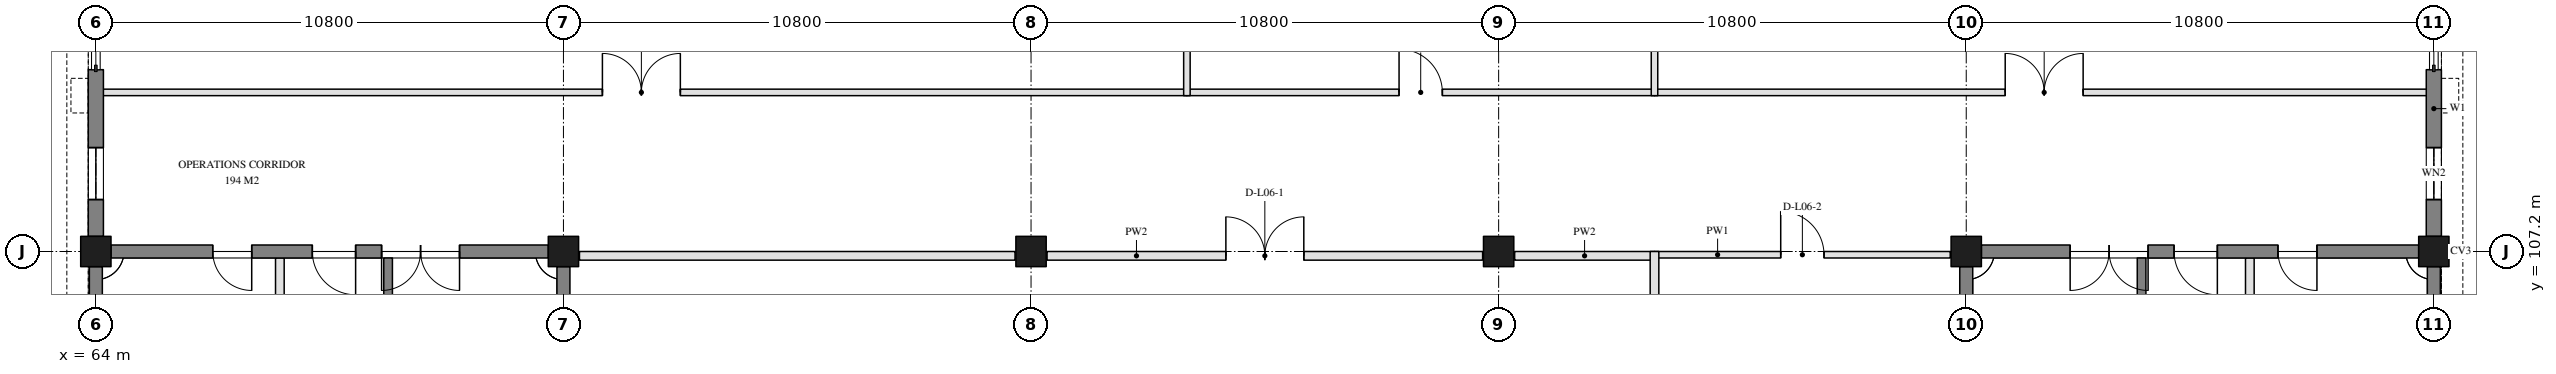
"""IFC4 building model, lengths in metres.
Left out: names, types, materials, properties, quantities, classifications, styles, units other than length and angle.
Written with IfcOpenShell. Run it as: python <this file> out.ifc"""

import sys

from ifc_helpers import new_model, si_unit, direction, frame, frame_2d, origin, origin_2d, place, context, subcontext, project, spatial, rectangle, extrude, element, fill, save


model = new_model("IFC4")
c1 = context("Model", 3, precision=1e-05, world=origin(), true_north=direction((0.0, 1.0)))
c2 = subcontext(c1, "Body", "Model", "MODEL_VIEW")
j1 = project(units=[si_unit("LENGTHUNIT", "METRE"), si_unit("PLANEANGLEUNIT", "RADIAN")], contexts=[c1])
p1 = place(None, origin())
s1 = spatial("IfcSite", under=j1, at=p1, CompositionType="ELEMENT")
p2 = place(p1, origin())
s2 = spatial("IfcBuilding", under=s1, at=p2, CompositionType="ELEMENT")
p3 = place(p2, frame((0.0, 0.0, 24.3)))
s3 = spatial("IfcBuildingStorey", under=s2, at=p3, CompositionType="ELEMENT", Elevation=24.3)
for number, where, z_axis, x_axis in (
    (1, (64.0, 107.2, 0.0), (0.0, 0.0, 1.0), (1.0, 0.0, 0.0)),
    (2, (74.8, 107.2, 0.0), (0.0, 0.0, 1.0), (1.0, 0.0, 0.0)),
    (3, (85.6, 107.2, 0.0), (0.0, 0.0, 1.0), (1.0, 0.0, 0.0)),
    (4, (96.4, 107.2, 0.0), (0.0, 0.0, 1.0), (1.0, 0.0, 0.0)),
    (5, (107.2, 107.2, 0.0), (0.0, 0.0, 1.0), (1.0, 0.0, 0.0)),
    (6, (118.0, 107.2, 0.0), (0.0, 0.0, 1.0), (1.0, 0.0, 0.0)),
):
    element("IfcColumn", number, at=place(p3, frame(where, z_axis=z_axis, x_axis=x_axis)), inside=s3, PredefinedType="COLUMN", context=c2, shape_type="SweptSolid", body=[
        extrude(rectangle(XDim=0.7, YDim=0.7, at=origin_2d()), origin(), (0.0, 0.0, 1.0), 3.9),
    ])
p4 = place(p3, frame((74.8, 96.75, 0.0), z_axis=(0.0, 0.0, 1.0), x_axis=(0.0, 1.0, 0.0)))
e7 = element("IfcWall", 7, at=p4, inside=s3, PredefinedType="SOLIDWALL", context=c2, shape_type="SweptSolid", body=[
    extrude(rectangle(XDim=10.1, YDim=0.3, at=frame_2d((5.05, 0.0))), origin(), (0.0, 0.0, 1.0), 3.9),
])
p5 = place(p3, frame((74.45, 107.2, 0.0), z_axis=(0.0, 0.0, 1.0), x_axis=(-1.0, 0.0, 0.0)))
e8 = element("IfcWall", 8, at=p5, inside=s3, PredefinedType="SOLIDWALL", context=c2, shape_type="SweptSolid", body=[
    extrude(rectangle(XDim=10.1, YDim=0.3, at=frame_2d((5.05, 0.0))), origin(), (0.0, 0.0, 1.0), 3.9),
])
p6 = place(p5, frame((2.05, 0.0, 0.0)))
e9 = element("IfcOpeningElement", 9, at=p6, cuts=e8, PredefinedType="OPENING", context=c2, shape_type="SweptSolid", body=[
    extrude(rectangle(XDim=1.8, YDim=2.1, at=frame_2d((0.9, 1.05))), frame((0.0, 0.16, 0.0), z_axis=(0.0, -1.0, 0.0), x_axis=(1.0, 0.0, 0.0)), (0.0, 0.0, 1.0), 0.32),
])
p7 = place(p5, frame((4.45, 0.0, 0.0)))
e10 = element("IfcOpeningElement", 10, at=p7, cuts=e8, PredefinedType="OPENING", context=c2, shape_type="SweptSolid", body=[
    extrude(rectangle(XDim=1.0, YDim=2.1, at=frame_2d((0.5, 1.05))), frame((0.0, 0.16, 0.0), z_axis=(0.0, -1.0, 0.0), x_axis=(1.0, 0.0, 0.0)), (0.0, 0.0, 1.0), 0.32),
])
p8 = place(p5, frame((6.85, 0.0, 0.0)))
e11 = element("IfcOpeningElement", 11, at=p8, cuts=e8, PredefinedType="OPENING", context=c2, shape_type="SweptSolid", body=[
    extrude(rectangle(XDim=0.9, YDim=2.1, at=frame_2d((0.45, 1.05))), frame((0.0, 0.16, 0.0), z_axis=(0.0, -1.0, 0.0), x_axis=(1.0, 0.0, 0.0)), (0.0, 0.0, 1.0), 0.32),
])
for number, where, z_axis, x_axis in (
    (12, (64.0, 106.85, 0.0), (0.0, 0.0, 1.0), (0.0, -1.0, 0.0)),
    (13, (118.0, 96.75, 0.0), (0.0, 0.0, 1.0), (0.0, 1.0, 0.0)),
):
    element("IfcWall", number, at=place(p3, frame(where, z_axis=z_axis, x_axis=x_axis)), inside=s3, PredefinedType="SOLIDWALL", context=c2, shape_type="SweptSolid", body=[
        extrude(rectangle(XDim=10.1, YDim=0.3, at=frame_2d((5.05, 0.0))), origin(), (0.0, 0.0, 1.0), 3.9),
    ])
p9 = place(p3, frame((117.65, 107.2, 0.0), z_axis=(0.0, 0.0, 1.0), x_axis=(-1.0, 0.0, 0.0)))
e14 = element("IfcWall", 14, at=p9, inside=s3, PredefinedType="SOLIDWALL", context=c2, shape_type="SweptSolid", body=[
    extrude(rectangle(XDim=10.1, YDim=0.3, at=frame_2d((5.05, 0.0))), origin(), (0.0, 0.0, 1.0), 3.9),
])
p10 = place(p9, frame((6.25, 0.0, 0.0)))
e15 = element("IfcOpeningElement", 15, at=p10, cuts=e14, PredefinedType="OPENING", context=c2, shape_type="SweptSolid", body=[
    extrude(rectangle(XDim=1.8, YDim=2.1, at=frame_2d((0.9, 1.05))), frame((0.0, 0.16, 0.0), z_axis=(0.0, -1.0, 0.0), x_axis=(1.0, 0.0, 0.0)), (0.0, 0.0, 1.0), 0.32),
])
p11 = place(p9, frame((4.65, 0.0, 0.0)))
e16 = element("IfcOpeningElement", 16, at=p11, cuts=e14, PredefinedType="OPENING", context=c2, shape_type="SweptSolid", body=[
    extrude(rectangle(XDim=1.0, YDim=2.1, at=frame_2d((0.5, 1.05))), frame((0.0, 0.16, 0.0), z_axis=(0.0, -1.0, 0.0), x_axis=(1.0, 0.0, 0.0)), (0.0, 0.0, 1.0), 0.32),
])
p12 = place(p9, frame((2.35, 0.0, 0.0)))
e17 = element("IfcOpeningElement", 17, at=p12, cuts=e14, PredefinedType="OPENING", context=c2, shape_type="SweptSolid", body=[
    extrude(rectangle(XDim=0.9, YDim=2.1, at=frame_2d((0.45, 1.05))), frame((0.0, 0.16, 0.0), z_axis=(0.0, -1.0, 0.0), x_axis=(1.0, 0.0, 0.0)), (0.0, 0.0, 1.0), 0.32),
])
p13 = place(p3, frame((107.2, 106.85, 0.0), z_axis=(0.0, 0.0, 1.0), x_axis=(0.0, -1.0, 0.0)))
e18 = element("IfcWall", 18, at=p13, inside=s3, PredefinedType="SOLIDWALL", context=c2, shape_type="SweptSolid", body=[
    extrude(rectangle(XDim=10.1, YDim=0.3, at=frame_2d((5.05, 0.0))), origin(), (0.0, 0.0, 1.0), 3.9),
])
p14 = place(p3, frame((64.0, 107.55, 0.0), z_axis=(0.0, 0.0, 1.0), x_axis=(0.0, 1.0, 0.0)))
e19 = element("IfcWall", 19, at=p14, inside=s3, PredefinedType="SOLIDWALL", context=c2, shape_type="SweptSolid", body=[
    extrude(rectangle(XDim=3.85, YDim=0.35, at=frame_2d((1.925, 0.0))), origin(), (0.0, 0.0, 1.0), 2.95),
])
p15 = place(p14, frame((0.85, 0.0, 0.9)))
e20 = element("IfcOpeningElement", 20, at=p15, cuts=e19, PredefinedType="OPENING", context=c2, shape_type="SweptSolid", body=[
    extrude(rectangle(XDim=1.2, YDim=1.2, at=frame_2d((0.6, 0.6))), frame((0.0, 0.185, 0.0), z_axis=(0.0, -1.0, 0.0), x_axis=(1.0, 0.0, 0.0)), (0.0, 0.0, 1.0), 0.37),
])
p16 = place(p3, frame((118.0, 107.55, 0.0), z_axis=(0.0, 0.0, 1.0), x_axis=(0.0, 1.0, 0.0)))
e21 = element("IfcWall", 21, at=p16, inside=s3, PredefinedType="SOLIDWALL", context=c2, shape_type="SweptSolid", body=[
    extrude(rectangle(XDim=3.85, YDim=0.35, at=frame_2d((1.925, 0.0))), origin(), (0.0, 0.0, 1.0), 2.95),
])
p17 = place(p16, frame((0.85, 0.0, 0.9)))
e22 = element("IfcOpeningElement", 22, at=p17, cuts=e21, PredefinedType="OPENING", context=c2, shape_type="SweptSolid", body=[
    extrude(rectangle(XDim=1.2, YDim=1.2, at=frame_2d((0.6, 0.6))), frame((0.0, 0.185, 0.0), z_axis=(0.0, -1.0, 0.0), x_axis=(1.0, 0.0, 0.0)), (0.0, 0.0, 1.0), 0.37),
])
p18 = place(p3, frame((70.75, 104.8, 0.0), z_axis=(0.0, 0.0, 1.0), x_axis=(0.0, 1.0, 0.0)))
e23 = element("IfcWall", 23, at=p18, inside=s3, PredefinedType="SOLIDWALL", context=c2, shape_type="SweptSolid", body=[
    extrude(rectangle(XDim=2.25, YDim=0.2, at=frame_2d((1.125, 0.0))), origin(), (0.0, 0.0, 1.0), 3.9),
])
p19 = place(p3, frame((68.25, 104.8, 0.0), z_axis=(0.0, 0.0, 1.0), x_axis=(0.0, 1.0, 0.0)))
e24 = element("IfcWall", 24, at=p19, inside=s3, PredefinedType="PARTITIONING", context=c2, shape_type="SweptSolid", body=[
    extrude(rectangle(XDim=2.25, YDim=0.2, at=frame_2d((1.125, 0.0))), origin(), (0.0, 0.0, 1.0), 3.9),
])
p20 = place(p3, frame((111.25, 107.05, 0.0), z_axis=(0.0, 0.0, 1.0), x_axis=(0.0, -1.0, 0.0)))
e25 = element("IfcWall", 25, at=p20, inside=s3, PredefinedType="SOLIDWALL", context=c2, shape_type="SweptSolid", body=[
    extrude(rectangle(XDim=2.25, YDim=0.2, at=frame_2d((1.125, 0.0))), origin(), (0.0, 0.0, 1.0), 3.9),
])
p21 = place(p3, frame((113.75, 107.05, 0.0), z_axis=(0.0, 0.0, 1.0), x_axis=(0.0, -1.0, 0.0)))
e26 = element("IfcWall", 26, at=p21, inside=s3, PredefinedType="PARTITIONING", context=c2, shape_type="SweptSolid", body=[
    extrude(rectangle(XDim=2.25, YDim=0.2, at=frame_2d((1.125, 0.0))), origin(), (0.0, 0.0, 1.0), 3.9),
])
p22 = place(p3, frame((96.77, 107.1, 0.0), z_axis=(0.0, 0.0, 1.0), x_axis=(1.0, 0.0, 0.0)))
e27 = element("IfcWall", 27, at=p22, inside=s3, PredefinedType="PARTITIONING", context=c2, shape_type="SweptSolid", body=[
    extrude(rectangle(XDim=3.23, YDim=0.2, at=frame_2d((1.615, 0.0))), origin(), (0.0, 0.0, 1.0), 3.75),
])
p23 = place(p3, frame((85.97, 107.1, 0.0), z_axis=(0.0, 0.0, 1.0), x_axis=(1.0, 0.0, 0.0)))
e28 = element("IfcWall", 28, at=p23, inside=s3, PredefinedType="PARTITIONING", context=c2, shape_type="SweptSolid", body=[
    extrude(rectangle(XDim=10.06, YDim=0.2, at=frame_2d((5.03, 0.0))), origin(), (0.0, 0.0, 1.0), 3.75),
])
p24 = place(p23, frame((4.13, 0.0, 0.0)))
e29 = element("IfcOpeningElement", 29, at=p24, cuts=e28, PredefinedType="OPENING", context=c2, shape_type="SweptSolid", body=[
    extrude(rectangle(XDim=1.8, YDim=2.1, at=frame_2d((0.9, 1.05))), frame((0.0, 0.11, 0.0), z_axis=(0.0, -1.0, 0.0), x_axis=(1.0, 0.0, 0.0)), (0.0, 0.0, 1.0), 0.22),
])
p25 = place(p3, frame((75.17, 107.1, 0.0), z_axis=(0.0, 0.0, 1.0), x_axis=(1.0, 0.0, 0.0)))
e30 = element("IfcWall", 30, at=p25, inside=s3, PredefinedType="PARTITIONING", context=c2, shape_type="SweptSolid", body=[
    extrude(rectangle(XDim=10.06, YDim=0.2, at=frame_2d((5.03, 0.0))), origin(), (0.0, 0.0, 1.0), 3.75),
])
p26 = place(p3, frame((100.0, 107.125, 0.0), z_axis=(0.0, 0.0, 1.0), x_axis=(1.0, 0.0, 0.0)))
e31 = element("IfcWall", 31, at=p26, inside=s3, PredefinedType="PARTITIONING", context=c2, shape_type="SweptSolid", body=[
    extrude(rectangle(XDim=6.83, YDim=0.15, at=frame_2d((3.415, 0.0))), origin(), (0.0, 0.0, 1.0), 3.75),
])
p27 = place(p26, frame((2.915, 0.0, 0.0)))
e32 = element("IfcOpeningElement", 32, at=p27, cuts=e31, PredefinedType="OPENING", context=c2, shape_type="SweptSolid", body=[
    extrude(rectangle(XDim=1.0, YDim=2.1, at=frame_2d((0.5, 1.05))), frame((0.0, 0.085, 0.0), z_axis=(0.0, -1.0, 0.0), x_axis=(1.0, 0.0, 0.0)), (0.0, 0.0, 1.0), 0.17),
])
p28 = place(p3, frame((64.0, 110.875, 0.0), z_axis=(0.0, 0.0, 1.0), x_axis=(1.0, 0.0, 0.0)))
e33 = element("IfcWall", 33, at=p28, inside=s3, PredefinedType="PARTITIONING", context=c2, shape_type="SweptSolid", body=[
    extrude(rectangle(XDim=25.2, YDim=0.15, at=frame_2d((12.6, 0.0))), origin(), (0.0, 0.0, 1.0), 2.95),
])
p29 = place(p28, frame((11.7, 0.0, 0.0)))
e34 = element("IfcOpeningElement", 34, at=p29, cuts=e33, PredefinedType="OPENING", context=c2, shape_type="SweptSolid", body=[
    extrude(rectangle(XDim=1.8, YDim=2.1, at=frame_2d((0.9, 1.05))), frame((0.0, 0.085, 0.0), z_axis=(0.0, -1.0, 0.0), x_axis=(1.0, 0.0, 0.0)), (0.0, 0.0, 1.0), 0.17),
])
p30 = place(p3, frame((89.2, 110.875, 0.0), z_axis=(0.0, 0.0, 1.0), x_axis=(1.0, 0.0, 0.0)))
e35 = element("IfcWall", 35, at=p30, inside=s3, PredefinedType="PARTITIONING", context=c2, shape_type="SweptSolid", body=[
    extrude(rectangle(XDim=10.8, YDim=0.15, at=frame_2d((5.4, 0.0))), origin(), (0.0, 0.0, 1.0), 3.235),
])
p31 = place(p30, frame((4.9, 0.0, 0.0)))
e36 = element("IfcOpeningElement", 36, at=p31, cuts=e35, PredefinedType="OPENING", context=c2, shape_type="SweptSolid", body=[
    extrude(rectangle(XDim=1.0, YDim=2.1, at=frame_2d((0.5, 1.05))), frame((0.0, 0.085, 0.0), z_axis=(0.0, -1.0, 0.0), x_axis=(1.0, 0.0, 0.0)), (0.0, 0.0, 1.0), 0.17),
])
p32 = place(p3, frame((100.0, 110.875, 0.0), z_axis=(0.0, 0.0, 1.0), x_axis=(1.0, 0.0, 0.0)))
e37 = element("IfcWall", 37, at=p32, inside=s3, PredefinedType="PARTITIONING", context=c2, shape_type="SweptSolid", body=[
    extrude(rectangle(XDim=18.0, YDim=0.15, at=frame_2d((9.0, 0.0))), origin(), (0.0, 0.0, 1.0), 2.95),
])
p33 = place(p32, frame((8.1, 0.0, 0.0)))
e38 = element("IfcOpeningElement", 38, at=p33, cuts=e37, PredefinedType="OPENING", context=c2, shape_type="SweptSolid", body=[
    extrude(rectangle(XDim=1.8, YDim=2.1, at=frame_2d((0.9, 1.05))), frame((0.0, 0.085, 0.0), z_axis=(0.0, -1.0, 0.0), x_axis=(1.0, 0.0, 0.0)), (0.0, 0.0, 1.0), 0.17),
])
p34 = place(p3, frame((100.0, 96.4, 0.0), z_axis=(0.0, 0.0, 1.0), x_axis=(0.0, 1.0, 0.0)))
e39 = element("IfcWall", 39, at=p34, inside=s3, PredefinedType="PARTITIONING", context=c2, shape_type="SweptSolid", body=[
    extrude(rectangle(XDim=10.8, YDim=0.2, at=frame_2d((5.4, 0.0))), origin(), (0.0, 0.0, 1.0), 2.95),
])
for number, where, z_axis, x_axis in (
    (40, (89.2, 110.8, 0.0), (0.0, 0.0, 1.0), (0.0, 1.0, 0.0)),
    (41, (100.0, 110.8, 0.0), (0.0, 0.0, 1.0), (0.0, 1.0, 0.0)),
):
    element("IfcWall", number, at=place(p3, frame(where, z_axis=z_axis, x_axis=x_axis)), inside=s3, PredefinedType="PARTITIONING", context=c2, shape_type="SweptSolid", body=[
        extrude(rectangle(XDim=7.2, YDim=0.15, at=frame_2d((3.6, 0.0))), origin(), (0.0, 0.0, 1.0), 2.95),
    ])
p35 = place(p15, origin())
e42 = element("IfcWindow", 42, at=p35, inside=s3, PartitioningType="SINGLE_PANEL", PredefinedType="WINDOW", context=c2, shape_type="SweptSolid", body=[
    extrude(rectangle(XDim=1.2, YDim=1.2, at=frame_2d((0.6, 0.6))), frame((0.0, 0.03, 0.0), z_axis=(0.0, -1.0, 0.0), x_axis=(1.0, 0.0, 0.0)), (0.0, 0.0, 1.0), 0.06),
])
fill(e20, e42)
p36 = place(p17, origin())
e43 = element("IfcWindow", 43, at=p36, inside=s3, PartitioningType="SINGLE_PANEL", PredefinedType="WINDOW", context=c2, shape_type="SweptSolid", body=[
    extrude(rectangle(XDim=1.2, YDim=1.2, at=frame_2d((0.6, 0.6))), frame((0.0, 0.03, 0.0), z_axis=(0.0, -1.0, 0.0), x_axis=(1.0, 0.0, 0.0)), (0.0, 0.0, 1.0), 0.06),
])
fill(e22, e43)
p37 = place(p6, frame((1.8, 0.0, 0.0), z_axis=(0.0, 0.0, 1.0), x_axis=(-1.0, 0.0, 0.0)))
e44 = element("IfcDoor", 44, at=p37, inside=s3, OperationType="DOUBLE_DOOR_DOUBLE_SWING", PredefinedType="DOOR", context=c2, shape_type="SweptSolid", body=[
    extrude(rectangle(XDim=1.8, YDim=2.1, at=frame_2d((0.9, 1.05))), frame((0.0, 0.025, 0.0), z_axis=(0.0, -1.0, 0.0), x_axis=(1.0, 0.0, 0.0)), (0.0, 0.0, 1.0), 0.05),
])
fill(e9, e44)
p38 = place(p7, origin())
e45 = element("IfcDoor", 45, at=p38, inside=s3, OperationType="SINGLE_SWING_LEFT", PredefinedType="DOOR", context=c2, shape_type="SweptSolid", body=[
    extrude(rectangle(XDim=1.0, YDim=2.1, at=frame_2d((0.5, 1.05))), frame((0.0, 0.025, 0.0), z_axis=(0.0, -1.0, 0.0), x_axis=(1.0, 0.0, 0.0)), (0.0, 0.0, 1.0), 0.05),
])
fill(e10, e45)
p39 = place(p8, origin())
e46 = element("IfcDoor", 46, at=p39, inside=s3, OperationType="SINGLE_SWING_RIGHT", PredefinedType="DOOR", context=c2, shape_type="SweptSolid", body=[
    extrude(rectangle(XDim=0.9, YDim=2.1, at=frame_2d((0.45, 1.05))), frame((0.0, 0.025, 0.0), z_axis=(0.0, -1.0, 0.0), x_axis=(1.0, 0.0, 0.0)), (0.0, 0.0, 1.0), 0.05),
])
fill(e11, e46)
p40 = place(p10, frame((1.8, 0.0, 0.0), z_axis=(0.0, 0.0, 1.0), x_axis=(-1.0, 0.0, 0.0)))
e47 = element("IfcDoor", 47, at=p40, inside=s3, OperationType="DOUBLE_DOOR_DOUBLE_SWING", PredefinedType="DOOR", context=c2, shape_type="SweptSolid", body=[
    extrude(rectangle(XDim=1.8, YDim=2.1, at=frame_2d((0.9, 1.05))), frame((0.0, 0.025, 0.0), z_axis=(0.0, -1.0, 0.0), x_axis=(1.0, 0.0, 0.0)), (0.0, 0.0, 1.0), 0.05),
])
fill(e15, e47)
p41 = place(p11, origin())
e48 = element("IfcDoor", 48, at=p41, inside=s3, OperationType="SINGLE_SWING_RIGHT", PredefinedType="DOOR", context=c2, shape_type="SweptSolid", body=[
    extrude(rectangle(XDim=1.0, YDim=2.1, at=frame_2d((0.5, 1.05))), frame((0.0, 0.025, 0.0), z_axis=(0.0, -1.0, 0.0), x_axis=(1.0, 0.0, 0.0)), (0.0, 0.0, 1.0), 0.05),
])
fill(e16, e48)
p42 = place(p12, origin())
e49 = element("IfcDoor", 49, at=p42, inside=s3, OperationType="SINGLE_SWING_LEFT", PredefinedType="DOOR", context=c2, shape_type="SweptSolid", body=[
    extrude(rectangle(XDim=0.9, YDim=2.1, at=frame_2d((0.45, 1.05))), frame((0.0, 0.025, 0.0), z_axis=(0.0, -1.0, 0.0), x_axis=(1.0, 0.0, 0.0)), (0.0, 0.0, 1.0), 0.05),
])
fill(e17, e49)
p43 = place(p24, frame((1.8, 0.0, 0.0), z_axis=(0.0, 0.0, 1.0), x_axis=(-1.0, 0.0, 0.0)))
e50 = element("IfcDoor", 50, at=p43, inside=s3, OperationType="DOUBLE_DOOR_DOUBLE_SWING", PredefinedType="DOOR", context=c2, shape_type="SweptSolid", body=[
    extrude(rectangle(XDim=1.8, YDim=2.1, at=frame_2d((0.9, 1.05))), frame((0.0, 0.025, 0.0), z_axis=(0.0, -1.0, 0.0), x_axis=(1.0, 0.0, 0.0)), (0.0, 0.0, 1.0), 0.05),
])
fill(e29, e50)
p44 = place(p27, frame((1.0, 0.0, 0.0), z_axis=(0.0, 0.0, 1.0), x_axis=(-1.0, 0.0, 0.0)))
e51 = element("IfcDoor", 51, at=p44, inside=s3, OperationType="SINGLE_SWING_RIGHT", PredefinedType="DOOR", context=c2, shape_type="SweptSolid", body=[
    extrude(rectangle(XDim=1.0, YDim=2.1, at=frame_2d((0.5, 1.05))), frame((0.0, 0.025, 0.0), z_axis=(0.0, -1.0, 0.0), x_axis=(1.0, 0.0, 0.0)), (0.0, 0.0, 1.0), 0.05),
])
fill(e32, e51)
p45 = place(p29, origin())
e52 = element("IfcDoor", 52, at=p45, inside=s3, OperationType="DOUBLE_DOOR_DOUBLE_SWING", PredefinedType="DOOR", context=c2, shape_type="SweptSolid", body=[
    extrude(rectangle(XDim=1.8, YDim=2.1, at=frame_2d((0.9, 1.05))), frame((0.0, 0.025, 0.0), z_axis=(0.0, -1.0, 0.0), x_axis=(1.0, 0.0, 0.0)), (0.0, 0.0, 1.0), 0.05),
])
fill(e34, e52)
p46 = place(p31, origin())
e53 = element("IfcDoor", 53, at=p46, inside=s3, OperationType="SINGLE_SWING_LEFT", PredefinedType="DOOR", context=c2, shape_type="SweptSolid", body=[
    extrude(rectangle(XDim=1.0, YDim=2.1, at=frame_2d((0.5, 1.05))), frame((0.0, 0.025, 0.0), z_axis=(0.0, -1.0, 0.0), x_axis=(1.0, 0.0, 0.0)), (0.0, 0.0, 1.0), 0.05),
])
fill(e36, e53)
p47 = place(p33, origin())
e54 = element("IfcDoor", 54, at=p47, inside=s3, OperationType="DOUBLE_DOOR_DOUBLE_SWING", PredefinedType="DOOR", context=c2, shape_type="SweptSolid", body=[
    extrude(rectangle(XDim=1.8, YDim=2.1, at=frame_2d((0.9, 1.05))), frame((0.0, 0.025, 0.0), z_axis=(0.0, -1.0, 0.0), x_axis=(1.0, 0.0, 0.0)), (0.0, 0.0, 1.0), 0.05),
])
fill(e38, e54)
save(model, sys.argv[1])
